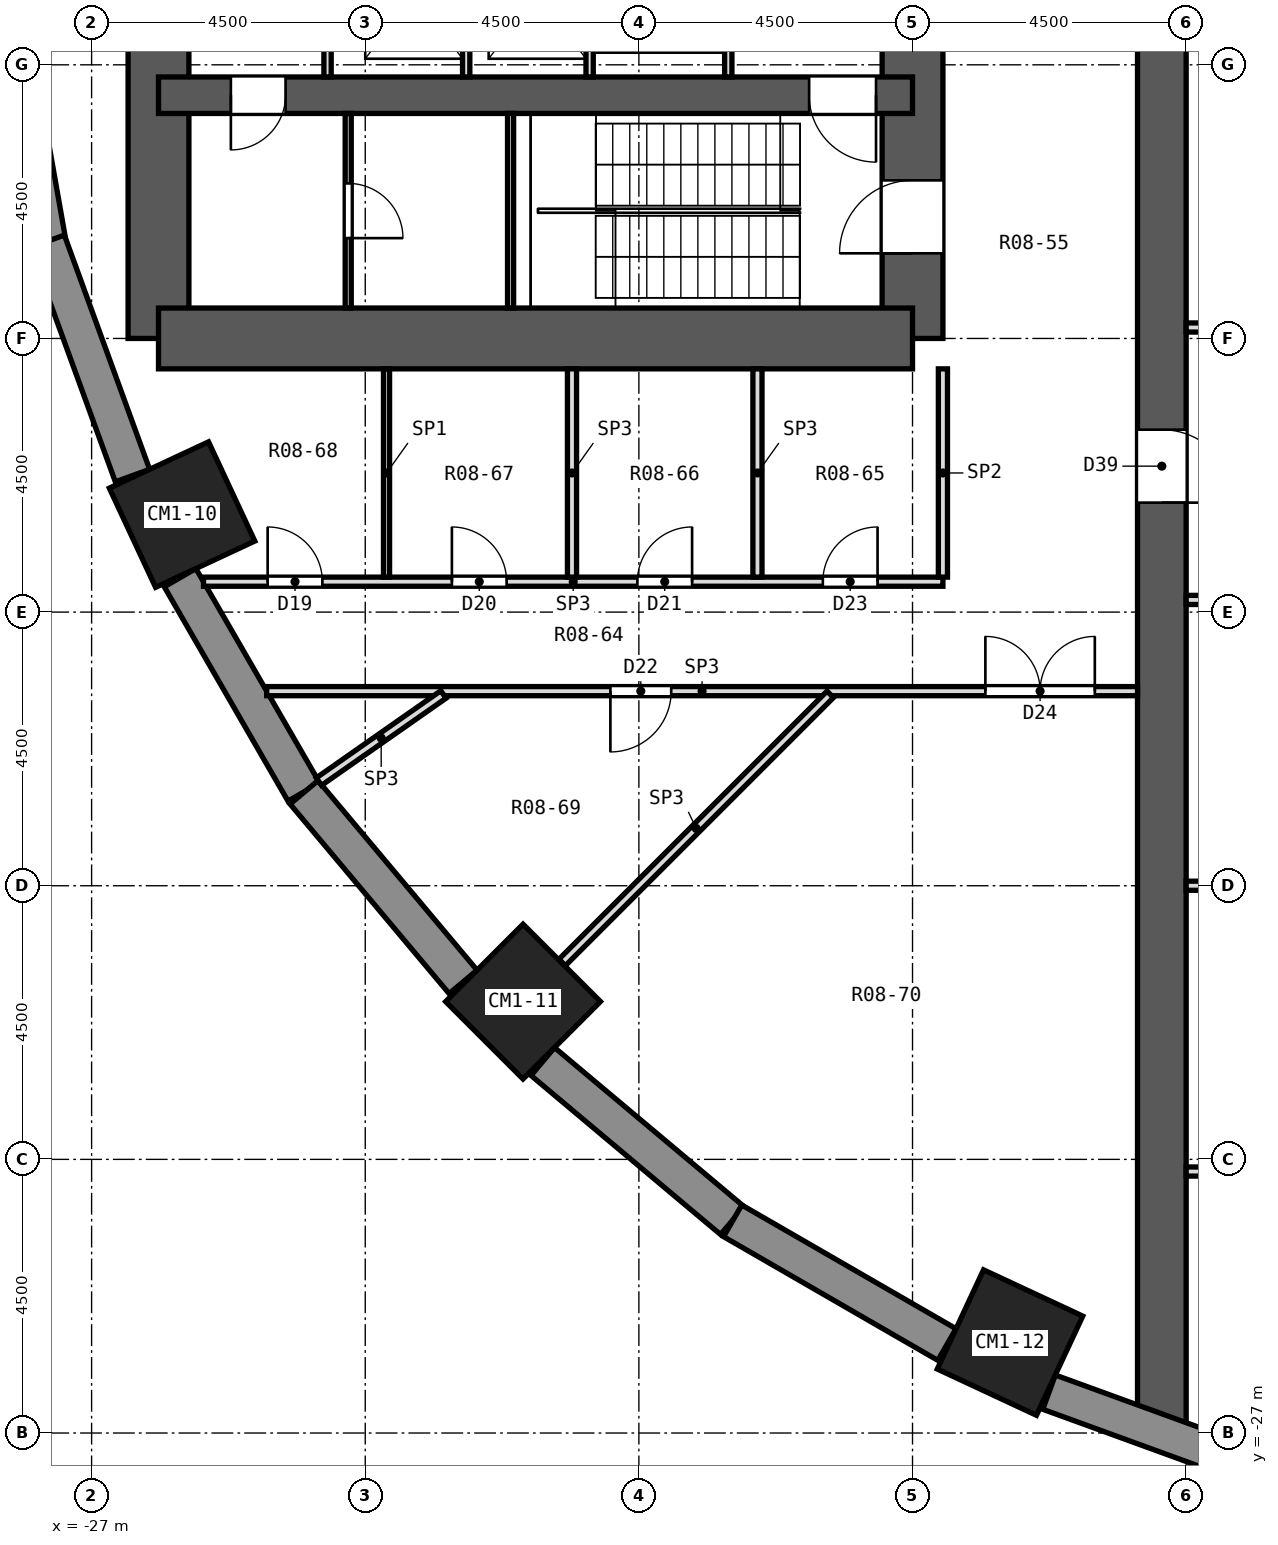
"""IFC4 building model, lengths in metres.
Left out: names, types, materials, properties, quantities, classifications, styles, units other than length and angle.
Written with IfcOpenShell. Run it as: python <this file> out.ifc"""

import sys

from ifc_helpers import new_model, si_unit, direction, frame, frame_2d, origin, origin_2d, place, context, subcontext, project, spatial, rectangle, extrude, element, fill, save


model = new_model("IFC4")
c1 = context("Model", 3, precision=1e-05, world=origin(), true_north=direction((0.0, 1.0)))
c2 = subcontext(c1, "Body", "Model", "MODEL_VIEW")
j1 = project(units=[si_unit("LENGTHUNIT", "METRE"), si_unit("PLANEANGLEUNIT", "RADIAN")], contexts=[c1])
p1 = place(None, origin())
s1 = spatial("IfcSite", under=j1, at=p1, CompositionType="ELEMENT")
p2 = place(p1, origin())
s2 = spatial("IfcBuilding", under=s1, at=p2, CompositionType="ELEMENT")
p3 = place(p2, frame((0.0, 0.0, 21.8)))
s3 = spatial("IfcBuildingStorey", under=s2, at=p3, CompositionType="ELEMENT", Elevation=21.8)
for number, where, z_axis, x_axis in (
    (1, (-25.512, -11.897, 0.0), (0.0, 0.0, 1.0), (-0.906, -0.423, 0.0)),
    (2, (-19.905, -19.905, 0.0), (0.0, 0.0, 1.0), (-0.707, -0.707, 0.0)),
    (3, (-11.897, -25.512, 0.0), (0.0, 0.0, 1.0), (-0.423, -0.906, 0.0)),
):
    element("IfcColumn", number, at=place(p3, frame(where, z_axis=z_axis, x_axis=x_axis)), inside=s3, PredefinedType="COLUMN", context=c2, shape_type="SweptSolid", body=[
        extrude(rectangle(XDim=1.8, YDim=1.8, at=origin_2d()), origin(), (0.0, 0.0, 1.0), 4.5),
    ])
p4 = place(p3, frame((-13.5, -9.0, 0.0), z_axis=(0.0, 0.0, 1.0), x_axis=(0.0, 1.0, 0.0)))
e4 = element("IfcWall", 4, at=p4, inside=s3, PredefinedType="SHEAR", context=c2, shape_type="SweptSolid", body=[
    extrude(rectangle(XDim=18.0, YDim=1.0, at=frame_2d((9.0, 0.0))), origin(), (0.0, 0.0, 1.0), 4.5),
])
p5 = place(p4, frame((15.4, 0.0, 0.0)))
e5 = element("IfcOpeningElement", 5, at=p5, cuts=e4, PredefinedType="OPENING", context=c2, shape_type="SweptSolid", body=[
    extrude(rectangle(XDim=1.2, YDim=2.1, at=frame_2d((0.6, 1.05))), frame((0.0, 0.512, 0.0), z_axis=(0.0, -1.0, 0.0), x_axis=(1.0, 0.0, 0.0)), (0.0, 0.0, 1.0), 1.024),
])
p6 = place(p4, frame((1.4, 0.0, 0.0)))
e6 = element("IfcOpeningElement", 6, at=p6, cuts=e4, PredefinedType="OPENING", context=c2, shape_type="SweptSolid", body=[
    extrude(rectangle(XDim=1.2, YDim=2.1, at=frame_2d((0.6, 1.05))), frame((0.0, 0.512, 0.0), z_axis=(0.0, -1.0, 0.0), x_axis=(1.0, 0.0, 0.0)), (0.0, 0.0, 1.0), 1.024),
])
p7 = place(p4, frame((7.5, 0.0, 0.0)))
e7 = element("IfcOpeningElement", 7, at=p7, cuts=e4, PredefinedType="OPENING", context=c2, shape_type="SweptSolid", body=[
    extrude(rectangle(XDim=3.0, YDim=2.4, at=frame_2d((1.5, 1.2))), frame((0.0, 0.512, 0.0), z_axis=(0.0, -1.0, 0.0), x_axis=(1.0, 0.0, 0.0)), (0.0, 0.0, 1.0), 1.024),
])
p8 = place(p3, frame((-25.9, -9.0, 0.0), z_axis=(0.0, 0.0, 1.0), x_axis=(0.0, 1.0, 0.0)))
e8 = element("IfcWall", 8, at=p8, inside=s3, PredefinedType="SHEAR", context=c2, shape_type="SweptSolid", body=[
    extrude(rectangle(XDim=18.0, YDim=1.0, at=frame_2d((9.0, 0.0))), origin(), (0.0, 0.0, 1.0), 4.5),
])
p9 = place(p3, frame((-13.5, -9.0, 0.0), z_axis=(0.0, 0.0, 1.0), x_axis=(-1.0, 0.0, 0.0)))
e9 = element("IfcWall", 9, at=p9, inside=s3, PredefinedType="SHEAR", context=c2, shape_type="SweptSolid", body=[
    extrude(rectangle(XDim=12.4, YDim=1.0, at=frame_2d((6.2, 0.0))), origin(), (0.0, 0.0, 1.0), 4.5),
])
p10 = place(p3, frame((-13.5, -5.0, 0.0), z_axis=(0.0, 0.0, 1.0), x_axis=(-1.0, 0.0, 0.0)))
e10 = element("IfcWall", 10, at=p10, inside=s3, PredefinedType="SHEAR", context=c2, shape_type="SweptSolid", body=[
    extrude(rectangle(XDim=12.4, YDim=0.6, at=frame_2d((6.2, 0.0))), origin(), (0.0, 0.0, 1.0), 4.5),
])
p11 = place(p10, frame((10.31, 0.0, 0.0)))
e11 = element("IfcOpeningElement", 11, at=p11, cuts=e10, PredefinedType="OPENING", context=c2, shape_type="SweptSolid", body=[
    extrude(rectangle(XDim=0.9, YDim=2.1, at=frame_2d((0.45, 1.05))), frame((0.0, 0.312, 0.0), z_axis=(0.0, -1.0, 0.0), x_axis=(1.0, 0.0, 0.0)), (0.0, 0.0, 1.0), 0.624),
])
p12 = place(p10, frame((0.6, 0.0, 0.0)))
e12 = element("IfcOpeningElement", 12, at=p12, cuts=e10, PredefinedType="OPENING", context=c2, shape_type="SweptSolid", body=[
    extrude(rectangle(XDim=1.1, YDim=2.1, at=frame_2d((0.55, 1.05))), frame((0.0, 0.312, 0.0), z_axis=(0.0, -1.0, 0.0), x_axis=(1.0, 0.0, 0.0)), (0.0, 0.0, 1.0), 0.624),
])
p13 = place(p3, frame((-9.4, -27.077, 0.0), z_axis=(0.0, 0.0, 1.0), x_axis=(0.0, 1.0, 0.0)))
e13 = element("IfcWall", 13, at=p13, inside=s3, PredefinedType="SHEAR", context=c2, shape_type="SweptSolid", body=[
    extrude(rectangle(XDim=54.154, YDim=0.8, at=frame_2d((27.077, 0.0))), origin(), (0.0, 0.0, 1.0), 4.5),
])
p14 = place(p13, frame((15.377, 0.0, 0.0)))
e14 = element("IfcOpeningElement", 14, at=p14, cuts=e13, PredefinedType="OPENING", context=c2, shape_type="SweptSolid", body=[
    extrude(rectangle(XDim=1.2, YDim=2.1, at=frame_2d((0.6, 1.05))), frame((0.0, 0.412, 0.0), z_axis=(0.0, -1.0, 0.0), x_axis=(1.0, 0.0, 0.0)), (0.0, 0.0, 1.0), 0.824),
])
p15 = place(p13, frame((37.577, 0.0, 0.0)))
e15 = element("IfcOpeningElement", 15, at=p15, cuts=e13, PredefinedType="OPENING", context=c2, shape_type="SweptSolid", body=[
    extrude(rectangle(XDim=1.2, YDim=2.1, at=frame_2d((0.6, 1.05))), frame((0.0, 0.412, 0.0), z_axis=(0.0, -1.0, 0.0), x_axis=(1.0, 0.0, 0.0)), (0.0, 0.0, 1.0), 0.824),
])
p16 = place(p3, frame((-28.428, -3.417, 0.0), z_axis=(0.0, 0.0, 1.0), x_axis=(0.173673210505, -0.984803338719, 0.0)))
e16 = element("IfcWall", 16, at=p16, inside=s3, PredefinedType="SOLIDWALL", context=c2, shape_type="SweptSolid", body=[
    extrude(rectangle(XDim=4.099, YDim=0.6, at=frame_2d((2.05, 0.0))), origin(), (0.0, 0.0, 1.0), 2.15),
])
p17 = place(p3, frame((-27.73, -7.403, 0.0), z_axis=(0.0, 0.0, 1.0), x_axis=(0.342034744565, -0.939687306241, 0.0)))
e17 = element("IfcWall", 17, at=p17, inside=s3, PredefinedType="SOLIDWALL", context=c2, shape_type="SweptSolid", body=[
    extrude(rectangle(XDim=4.099, YDim=0.6, at=frame_2d((2.05, 0.0))), origin(), (0.0, 0.0, 1.0), 2.15),
])
p18 = place(p3, frame((-25.545, -12.934, 0.0), z_axis=(0.0, 0.0, 1.0), x_axis=(0.500023678693, -0.866011732453, 0.0)))
e18 = element("IfcWall", 18, at=p18, inside=s3, PredefinedType="SOLIDWALL", context=c2, shape_type="SweptSolid", body=[
    extrude(rectangle(XDim=4.069, YDim=0.6, at=frame_2d((2.035, 0.0))), origin(), (0.0, 0.0, 1.0), 2.15),
])
for number, where, z_axis, x_axis in (
    (19, (-23.506, -16.464, 0.0), (0.0, 0.0, 1.0), (0.643, -0.766, 0.0)),
    (20, (-19.581, -20.891, 0.0), (0.0, 0.0, 1.0), (0.766, -0.643, 0.0)),
):
    element("IfcWall", number, at=place(p3, frame(where, z_axis=z_axis, x_axis=x_axis)), inside=s3, PredefinedType="SOLIDWALL", context=c2, shape_type="SweptSolid", body=[
        extrude(rectangle(XDim=4.069, YDim=0.6, at=frame_2d((2.035, 0.0))), origin(), (0.0, 0.0, 1.0), 2.15),
    ])
p19 = place(p3, frame((-16.458, -23.51, 0.0), z_axis=(0.0, 0.0, 1.0), x_axis=(0.866011732453, -0.500023678693, 0.0)))
e21 = element("IfcWall", 21, at=p19, inside=s3, PredefinedType="SOLIDWALL", context=c2, shape_type="SweptSolid", body=[
    extrude(rectangle(XDim=4.069, YDim=0.6, at=frame_2d((2.035, 0.0))), origin(), (0.0, 0.0, 1.0), 2.15),
])
p20 = place(p3, frame((-11.255, -26.328, 0.0), z_axis=(0.0, 0.0, 1.0), x_axis=(0.939683013865, -0.342046536971, 0.0)))
e22 = element("IfcWall", 22, at=p20, inside=s3, PredefinedType="SOLIDWALL", context=c2, shape_type="SweptSolid", body=[
    extrude(rectangle(XDim=4.069, YDim=0.6, at=frame_2d((2.035, 0.0))), origin(), (0.0, 0.0, 1.0), 3.95),
])
for number, where, z_axis, x_axis in (
    (23, (-9.0, -22.7, 0.0), (0.0, 0.0, 1.0), (1.0, 0.0, 0.0)),
    (24, (-9.0, -18.0, 0.0), (0.0, 0.0, 1.0), (1.0, 0.0, 0.0)),
):
    element("IfcWall", number, at=place(p3, frame(where, z_axis=z_axis, x_axis=x_axis)), inside=s3, PredefinedType="PARTITIONING", context=c2, shape_type="SweptSolid", body=[
        extrude(rectangle(XDim=9.225, YDim=0.15, at=frame_2d((4.613, 0.0))), origin(), (0.0, 0.0, 1.0), 3.95),
    ])
p21 = place(p3, frame((-24.121, -14.8, 0.0), z_axis=(0.0, 0.0, 1.0), x_axis=(1.0, 0.0, 0.0)))
e25 = element("IfcWall", 25, at=p21, inside=s3, PredefinedType="PARTITIONING", context=c2, shape_type="SweptSolid", body=[
    extrude(rectangle(XDim=14.321, YDim=0.15, at=frame_2d((7.161, 0.0))), origin(), (0.0, 0.0, 1.0), 3.95),
])
p22 = place(p21, frame((5.653, 0.0, 0.0)))
e26 = element("IfcOpeningElement", 26, at=p22, cuts=e25, PredefinedType="OPENING", context=c2, shape_type="SweptSolid", body=[
    extrude(rectangle(XDim=1.0, YDim=2.1, at=frame_2d((0.5, 1.05))), frame((0.0, 0.087, 0.0), z_axis=(0.0, -1.0, 0.0), x_axis=(1.0, 0.0, 0.0)), (0.0, 0.0, 1.0), 0.174),
])
p23 = place(p21, frame((11.819, 0.0, 0.0)))
e27 = element("IfcOpeningElement", 27, at=p23, cuts=e25, PredefinedType="OPENING", context=c2, shape_type="SweptSolid", body=[
    extrude(rectangle(XDim=1.8, YDim=2.1, at=frame_2d((0.9, 1.05))), frame((0.0, 0.087, 0.0), z_axis=(0.0, -1.0, 0.0), x_axis=(1.0, 0.0, 0.0)), (0.0, 0.0, 1.0), 0.174),
])
p24 = place(p3, frame((-9.0, -13.3, 0.0), z_axis=(0.0, 0.0, 1.0), x_axis=(1.0, 0.0, 0.0)))
e28 = element("IfcWall", 28, at=p24, inside=s3, PredefinedType="PARTITIONING", context=c2, shape_type="SweptSolid", body=[
    extrude(rectangle(XDim=9.3, YDim=0.15, at=frame_2d((4.65, 0.0))), origin(), (0.0, 0.0, 1.0), 3.95),
])
p25 = place(p3, frame((-25.16, -13.0, 0.0), z_axis=(0.0, 0.0, 1.0), x_axis=(1.0, 0.0, 0.0)))
e29 = element("IfcWall", 29, at=p25, inside=s3, PredefinedType="PARTITIONING", context=c2, shape_type="SweptSolid", body=[
    extrude(rectangle(XDim=12.16, YDim=0.15, at=frame_2d((6.08, 0.0))), origin(), (0.0, 0.0, 1.0), 3.95),
])
p26 = place(p25, frame((1.055, 0.0, 0.0)))
e30 = element("IfcOpeningElement", 30, at=p26, cuts=e29, PredefinedType="OPENING", context=c2, shape_type="SweptSolid", body=[
    extrude(rectangle(XDim=0.9, YDim=2.1, at=frame_2d((0.45, 1.05))), frame((0.0, 0.087, 0.0), z_axis=(0.0, -1.0, 0.0), x_axis=(1.0, 0.0, 0.0)), (0.0, 0.0, 1.0), 0.174),
])
p27 = place(p25, frame((4.085, 0.0, 0.0)))
e31 = element("IfcOpeningElement", 31, at=p27, cuts=e29, PredefinedType="OPENING", context=c2, shape_type="SweptSolid", body=[
    extrude(rectangle(XDim=0.9, YDim=2.1, at=frame_2d((0.45, 1.05))), frame((0.0, 0.087, 0.0), z_axis=(0.0, -1.0, 0.0), x_axis=(1.0, 0.0, 0.0)), (0.0, 0.0, 1.0), 0.174),
])
p28 = place(p25, frame((7.135, 0.0, 0.0)))
e32 = element("IfcOpeningElement", 32, at=p28, cuts=e29, PredefinedType="OPENING", context=c2, shape_type="SweptSolid", body=[
    extrude(rectangle(XDim=0.9, YDim=2.1, at=frame_2d((0.45, 1.05))), frame((0.0, 0.087, 0.0), z_axis=(0.0, -1.0, 0.0), x_axis=(1.0, 0.0, 0.0)), (0.0, 0.0, 1.0), 0.174),
])
p29 = place(p25, frame((10.185, 0.0, 0.0)))
e33 = element("IfcOpeningElement", 33, at=p29, cuts=e29, PredefinedType="OPENING", context=c2, shape_type="SweptSolid", body=[
    extrude(rectangle(XDim=0.9, YDim=2.1, at=frame_2d((0.45, 1.05))), frame((0.0, 0.087, 0.0), z_axis=(0.0, -1.0, 0.0), x_axis=(1.0, 0.0, 0.0)), (0.0, 0.0, 1.0), 0.174),
])
p30 = place(p3, frame((-9.0, -8.82, 0.0), z_axis=(0.0, 0.0, 1.0), x_axis=(1.0, 0.0, 0.0)))
e34 = element("IfcWall", 34, at=p30, inside=s3, PredefinedType="PARTITIONING", context=c2, shape_type="SweptSolid", body=[
    extrude(rectangle(XDim=18.0, YDim=0.15, at=frame_2d((9.0, 0.0))), origin(), (0.0, 0.0, 1.0), 3.95),
])
p31 = place(p3, frame((-23.262, -16.288, 0.0), z_axis=(0.0, 0.0, 1.0), x_axis=(0.81919520462, 0.573514792073, 0.0)))
e35 = element("IfcWall", 35, at=p31, inside=s3, PredefinedType="PARTITIONING", context=c2, shape_type="SweptSolid", body=[
    extrude(rectangle(XDim=2.499, YDim=0.15, at=frame_2d((1.25, 0.0))), origin(), (0.0, 0.0, 1.0), 3.95),
])
p32 = place(p3, frame((-19.262, -19.262, 0.0), z_axis=(0.0, 0.0, 1.0), x_axis=(0.707106781187, 0.707106781187, 0.0)))
e36 = element("IfcWall", 36, at=p32, inside=s3, PredefinedType="PARTITIONING", context=c2, shape_type="SweptSolid", body=[
    extrude(rectangle(XDim=6.235, YDim=0.15, at=frame_2d((3.117, 0.0))), origin(), (0.0, 0.0, 1.0), 3.95),
])
for number, where, z_axis, x_axis in (
    (37, (-13.0, -12.925, 0.0), (0.0, 0.0, 1.0), (0.0, 1.0, 0.0)),
    (38, (-16.05, -12.925, 0.0), (0.0, 0.0, 1.0), (0.0, 1.0, 0.0)),
    (39, (-19.1, -12.925, 0.0), (0.0, 0.0, 1.0), (0.0, 1.0, 0.0)),
):
    element("IfcWall", number, at=place(p3, frame(where, z_axis=z_axis, x_axis=x_axis)), inside=s3, PredefinedType="PARTITIONING", context=c2, shape_type="SweptSolid", body=[
        extrude(rectangle(XDim=3.425, YDim=0.15, at=frame_2d((1.712, 0.0))), origin(), (0.0, 0.0, 1.0), 3.95),
    ])
p33 = place(p3, frame((-22.15, -12.925, 0.0), z_axis=(0.0, 0.0, 1.0), x_axis=(0.0, 1.0, 0.0)))
e40 = element("IfcWall", 40, at=p33, inside=s3, PredefinedType="PARTITIONING", context=c2, shape_type="SweptSolid", body=[
    extrude(rectangle(XDim=3.425, YDim=0.1, at=frame_2d((1.712, 0.0))), origin(), (0.0, 0.0, 1.0), 3.95),
])
p34 = place(p3, frame((-16.53, -4.7, 0.0), z_axis=(0.0, 0.0, 1.0), x_axis=(0.0, 1.0, 0.0)))
e41 = element("IfcWall", 41, at=p34, inside=s3, PredefinedType="PARTITIONING", context=c2, shape_type="SweptSolid", body=[
    extrude(rectangle(XDim=2.4, YDim=0.12, at=frame_2d((1.2, 0.0))), origin(), (0.0, 0.0, 1.0), 3.95),
])
p35 = place(p34, frame((0.65, 0.0, 0.0)))
e42 = element("IfcOpeningElement", 42, at=p35, cuts=e41, PredefinedType="OPENING", context=c2, shape_type="SweptSolid", body=[
    extrude(rectangle(XDim=1.1, YDim=2.1, at=frame_2d((0.55, 1.05))), frame((0.0, 0.072, 0.0), z_axis=(0.0, -1.0, 0.0), x_axis=(1.0, 0.0, 0.0)), (0.0, 0.0, 1.0), 0.144),
])
for number, where, z_axis, x_axis in (
    (43, (-18.81, -4.7, 0.0), (0.0, 0.0, 1.0), (0.0, 1.0, 0.0)),
    (44, (-20.84, -4.7, 0.0), (0.0, 0.0, 1.0), (0.0, 1.0, 0.0)),
    (45, (-23.12, -4.7, 0.0), (0.0, 0.0, 1.0), (0.0, 1.0, 0.0)),
):
    element("IfcWall", number, at=place(p3, frame(where, z_axis=z_axis, x_axis=x_axis)), inside=s3, PredefinedType="PARTITIONING", context=c2, shape_type="SweptSolid", body=[
        extrude(rectangle(XDim=2.4, YDim=0.12, at=frame_2d((1.2, 0.0))), origin(), (0.0, 0.0, 1.0), 3.95),
    ])
p36 = place(p3, frame((-20.11, -8.5, 0.0), z_axis=(0.0, 0.0, 1.0), x_axis=(0.0, 1.0, 0.0)))
e46 = element("IfcWall", 46, at=p36, inside=s3, PredefinedType="PARTITIONING", context=c2, shape_type="SweptSolid", body=[
    extrude(rectangle(XDim=3.2, YDim=0.1, at=frame_2d((1.6, 0.0))), origin(), (0.0, 0.0, 1.0), 3.95),
])
p37 = place(p3, frame((-22.78, -8.5, 0.0), z_axis=(0.0, 0.0, 1.0), x_axis=(0.0, 1.0, 0.0)))
e47 = element("IfcWall", 47, at=p37, inside=s3, PredefinedType="PARTITIONING", context=c2, shape_type="SweptSolid", body=[
    extrude(rectangle(XDim=3.2, YDim=0.1, at=frame_2d((1.6, 0.0))), origin(), (0.0, 0.0, 1.0), 3.95),
])
p38 = place(p37, frame((1.15, 0.0, 0.0)))
e48 = element("IfcOpeningElement", 48, at=p38, cuts=e47, PredefinedType="OPENING", context=c2, shape_type="SweptSolid", body=[
    extrude(rectangle(XDim=0.9, YDim=2.1, at=frame_2d((0.45, 1.05))), frame((0.0, 0.062, 0.0), z_axis=(0.0, -1.0, 0.0), x_axis=(1.0, 0.0, 0.0)), (0.0, 0.0, 1.0), 0.124),
])
p39 = place(p26, origin())
e49 = element("IfcDoor", 49, at=p39, inside=s3, OperationType="SINGLE_SWING_LEFT", PredefinedType="DOOR", context=c2, shape_type="SweptSolid", body=[
    extrude(rectangle(XDim=0.9, YDim=2.1, at=frame_2d((0.45, 1.05))), frame((0.0, 0.025, 0.0), z_axis=(0.0, -1.0, 0.0), x_axis=(1.0, 0.0, 0.0)), (0.0, 0.0, 1.0), 0.05),
])
fill(e30, e49)
p40 = place(p27, origin())
e50 = element("IfcDoor", 50, at=p40, inside=s3, OperationType="SINGLE_SWING_LEFT", PredefinedType="DOOR", context=c2, shape_type="SweptSolid", body=[
    extrude(rectangle(XDim=0.9, YDim=2.1, at=frame_2d((0.45, 1.05))), frame((0.0, 0.025, 0.0), z_axis=(0.0, -1.0, 0.0), x_axis=(1.0, 0.0, 0.0)), (0.0, 0.0, 1.0), 0.05),
])
fill(e31, e50)
p41 = place(p28, origin())
e51 = element("IfcDoor", 51, at=p41, inside=s3, OperationType="SINGLE_SWING_RIGHT", PredefinedType="DOOR", context=c2, shape_type="SweptSolid", body=[
    extrude(rectangle(XDim=0.9, YDim=2.1, at=frame_2d((0.45, 1.05))), frame((0.0, 0.025, 0.0), z_axis=(0.0, -1.0, 0.0), x_axis=(1.0, 0.0, 0.0)), (0.0, 0.0, 1.0), 0.05),
])
fill(e32, e51)
p42 = place(p22, frame((1.0, 0.0, 0.0), z_axis=(0.0, 0.0, 1.0), x_axis=(-1.0, 0.0, 0.0)))
e52 = element("IfcDoor", 52, at=p42, inside=s3, OperationType="SINGLE_SWING_RIGHT", PredefinedType="DOOR", context=c2, shape_type="SweptSolid", body=[
    extrude(rectangle(XDim=1.0, YDim=2.1, at=frame_2d((0.5, 1.05))), frame((0.0, 0.025, 0.0), z_axis=(0.0, -1.0, 0.0), x_axis=(1.0, 0.0, 0.0)), (0.0, 0.0, 1.0), 0.05),
])
fill(e26, e52)
p43 = place(p29, origin())
e53 = element("IfcDoor", 53, at=p43, inside=s3, OperationType="SINGLE_SWING_RIGHT", PredefinedType="DOOR", context=c2, shape_type="SweptSolid", body=[
    extrude(rectangle(XDim=0.9, YDim=2.1, at=frame_2d((0.45, 1.05))), frame((0.0, 0.025, 0.0), z_axis=(0.0, -1.0, 0.0), x_axis=(1.0, 0.0, 0.0)), (0.0, 0.0, 1.0), 0.05),
])
fill(e33, e53)
p44 = place(p23, origin())
e54 = element("IfcDoor", 54, at=p44, inside=s3, OperationType="DOUBLE_DOOR_SINGLE_SWING", PredefinedType="DOOR", context=c2, shape_type="SweptSolid", body=[
    extrude(rectangle(XDim=1.8, YDim=2.1, at=frame_2d((0.9, 1.05))), frame((0.0, 0.025, 0.0), z_axis=(0.0, -1.0, 0.0), x_axis=(1.0, 0.0, 0.0)), (0.0, 0.0, 1.0), 0.05),
])
fill(e27, e54)
p45 = place(p14, frame((1.2, 0.0, 0.0), z_axis=(0.0, 0.0, 1.0), x_axis=(-1.0, 0.0, 0.0)))
e55 = element("IfcDoor", 55, at=p45, inside=s3, OperationType="SINGLE_SWING_RIGHT", PredefinedType="DOOR", context=c2, shape_type="SweptSolid", body=[
    extrude(rectangle(XDim=1.2, YDim=2.1, at=frame_2d((0.6, 1.05))), frame((0.0, 0.025, 0.0), z_axis=(0.0, -1.0, 0.0), x_axis=(1.0, 0.0, 0.0)), (0.0, 0.0, 1.0), 0.05),
])
fill(e14, e55)
p46 = place(p38, frame((0.9, 0.0, 0.0), z_axis=(0.0, 0.0, 1.0), x_axis=(-1.0, 0.0, 0.0)))
e56 = element("IfcDoor", 56, at=p46, inside=s3, OperationType="SINGLE_SWING_RIGHT", PredefinedType="DOOR", context=c2, shape_type="SweptSolid", body=[
    extrude(rectangle(XDim=0.9, YDim=2.1, at=frame_2d((0.45, 1.05))), frame((0.0, 0.025, 0.0), z_axis=(0.0, -1.0, 0.0), x_axis=(1.0, 0.0, 0.0)), (0.0, 0.0, 1.0), 0.05),
])
fill(e48, e56)
p47 = place(p11, origin())
e57 = element("IfcDoor", 57, at=p47, inside=s3, OperationType="SINGLE_SWING_RIGHT", PredefinedType="DOOR", context=c2, shape_type="SweptSolid", body=[
    extrude(rectangle(XDim=0.9, YDim=2.1, at=frame_2d((0.45, 1.05))), frame((0.0, 0.025, 0.0), z_axis=(0.0, -1.0, 0.0), x_axis=(1.0, 0.0, 0.0)), (0.0, 0.0, 1.0), 0.05),
])
fill(e11, e57)
p48 = place(p12, origin())
e58 = element("IfcDoor", 58, at=p48, inside=s3, OperationType="SINGLE_SWING_LEFT", PredefinedType="DOOR", context=c2, shape_type="SweptSolid", body=[
    extrude(rectangle(XDim=1.1, YDim=2.1, at=frame_2d((0.55, 1.05))), frame((0.0, 0.025, 0.0), z_axis=(0.0, -1.0, 0.0), x_axis=(1.0, 0.0, 0.0)), (0.0, 0.0, 1.0), 0.05),
])
fill(e12, e58)
p49 = place(p6, origin())
e59 = element("IfcDoor", 59, at=p49, inside=s3, OperationType="SINGLE_SWING_LEFT", PredefinedType="DOOR", context=c2, shape_type="SweptSolid", body=[
    extrude(rectangle(XDim=1.2, YDim=2.1, at=frame_2d((0.6, 1.05))), frame((0.0, 0.025, 0.0), z_axis=(0.0, -1.0, 0.0), x_axis=(1.0, 0.0, 0.0)), (0.0, 0.0, 1.0), 0.05),
])
fill(e6, e59)
save(model, sys.argv[1])
